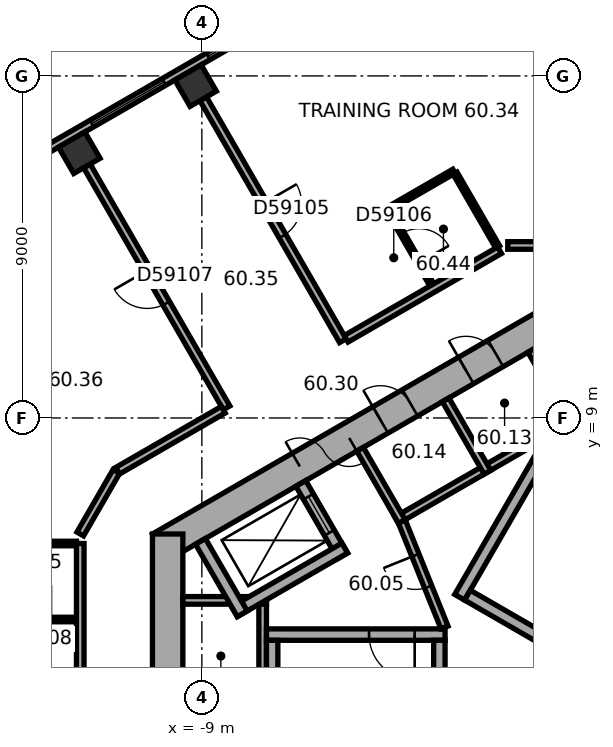
"""IFC4 building model, lengths in metres.
Left out: names, types, materials, properties, quantities, classifications, styles, units other than length and angle.
Written with IfcOpenShell. Run it as: python <this file> out.ifc"""

import sys

from ifc_helpers import new_model, si_unit, direction, frame, frame_2d, origin, origin_2d, place, context, subcontext, project, spatial, rectangle, extrude, element, fill, save


model = new_model("IFC4")
c1 = context("Model", 3, precision=1e-05, world=origin(), true_north=direction((0.0, 1.0)))
c2 = subcontext(c1, "Body", "Model", "MODEL_VIEW")
j1 = project(units=[si_unit("LENGTHUNIT", "METRE"), si_unit("PLANEANGLEUNIT", "RADIAN")], contexts=[c1])
p1 = place(None, origin())
s1 = spatial("IfcSite", under=j1, at=p1, CompositionType="ELEMENT")
p2 = place(p1, origin())
s2 = spatial("IfcBuilding", under=s1, at=p2, CompositionType="ELEMENT")
p3 = place(p2, frame((0.0, 0.0, 243.9)))
s3 = spatial("IfcBuildingStorey", under=s2, at=p3, CompositionType="ELEMENT", Elevation=243.9)
for number, where, z_axis, x_axis in (
    (1, (-9.165, 17.745, 0.0), (0.0, 0.0, 1.0), (-0.866, -0.5, 0.0)),
    (2, (-12.225, 15.978, 0.0), (0.0, 0.0, 1.0), (-0.866, -0.5, 0.0)),
):
    element("IfcColumn", number, at=place(p3, frame(where, z_axis=z_axis, x_axis=x_axis)), inside=s3, PredefinedType="COLUMN", context=c2, shape_type="SweptSolid", body=[
        extrude(rectangle(XDim=0.8, YDim=0.8, at=origin_2d()), origin(), (0.0, 0.0, 1.0), 3.7),
    ])
p4 = place(p3, frame((10.1, 5.6, 0.0), z_axis=(0.0, 0.0, 1.0), x_axis=(-0.866023897231, 0.500002609418, 0.0)))
e3 = element("IfcWall", 3, at=p4, inside=s3, PredefinedType="SHEAR", context=c2, shape_type="SweptSolid", body=[
    extrude(rectangle(XDim=11.894, YDim=0.8, at=frame_2d((5.947, 0.0))), origin(), (0.0, 0.0, 1.0), 3.7),
])
p5 = place(p4, frame((3.897, 0.0, 0.0)))
e4 = element("IfcOpeningElement", 4, at=p5, cuts=e3, PredefinedType="OPENING", context=c2, shape_type="SweptSolid", body=[
    extrude(rectangle(XDim=0.9, YDim=2.1, at=frame_2d((0.45, 1.05))), frame((0.0, 0.41, 0.0), z_axis=(0.0, -1.0, 0.0), x_axis=(1.0, 0.0, 0.0)), (0.0, 0.0, 1.0), 0.82),
])
p6 = place(p4, frame((7.797, 0.0, 0.0)))
e5 = element("IfcOpeningElement", 5, at=p6, cuts=e3, PredefinedType="OPENING", context=c2, shape_type="SweptSolid", body=[
    extrude(rectangle(XDim=0.9, YDim=2.1, at=frame_2d((0.45, 1.05))), frame((0.0, 0.41, 0.0), z_axis=(0.0, -1.0, 0.0), x_axis=(1.0, 0.0, 0.0)), (0.0, 0.0, 1.0), 0.82),
])
p7 = place(p3, frame((0.2, 11.547, 0.0), z_axis=(0.0, 0.0, 1.0), x_axis=(-0.866023897231, -0.500002609418, 0.0)))
e6 = element("IfcWall", 6, at=p7, inside=s3, PredefinedType="SHEAR", context=c2, shape_type="SweptSolid", body=[
    extrude(rectangle(XDim=11.894, YDim=0.8, at=frame_2d((5.947, 0.0))), origin(), (0.0, 0.0, 1.0), 3.7),
])
p8 = place(p7, frame((6.147, 0.0, 0.0)))
e7 = element("IfcOpeningElement", 7, at=p8, cuts=e6, PredefinedType="OPENING", context=c2, shape_type="SweptSolid", body=[
    extrude(rectangle(XDim=1.5, YDim=2.1, at=frame_2d((0.75, 1.05))), frame((0.0, 0.41, 0.0), z_axis=(0.0, -1.0, 0.0), x_axis=(1.0, 0.0, 0.0)), (0.0, 0.0, 1.0), 0.82),
])
p9 = place(p7, frame((1.697, 0.0, 0.0)))
e8 = element("IfcOpeningElement", 8, at=p9, cuts=e6, PredefinedType="OPENING", context=c2, shape_type="SweptSolid", body=[
    extrude(rectangle(XDim=0.9, YDim=2.1, at=frame_2d((0.45, 1.05))), frame((0.0, 0.41, 0.0), z_axis=(0.0, -1.0, 0.0), x_axis=(1.0, 0.0, 0.0)), (0.0, 0.0, 1.0), 0.82),
])
p10 = place(p7, frame((4.297, 0.0, 0.0)))
e9 = element("IfcOpeningElement", 9, at=p10, cuts=e6, PredefinedType="OPENING", context=c2, shape_type="SweptSolid", body=[
    extrude(rectangle(XDim=0.9, YDim=2.1, at=frame_2d((0.45, 1.05))), frame((0.0, 0.41, 0.0), z_axis=(0.0, -1.0, 0.0), x_axis=(1.0, 0.0, 0.0)), (0.0, 0.0, 1.0), 0.82),
])
p11 = place(p3, frame((-9.9, 5.947, 0.0), z_axis=(0.0, 0.0, 1.0), x_axis=(0.0, -1.0, 0.0)))
e10 = element("IfcWall", 10, at=p11, inside=s3, PredefinedType="SHEAR", context=c2, shape_type="SweptSolid", body=[
    extrude(rectangle(XDim=11.894, YDim=0.8, at=frame_2d((5.947, 0.0))), origin(), (0.0, 0.0, 1.0), 3.7),
])
p12 = place(p11, frame((5.097, 0.0, 0.0)))
e11 = element("IfcOpeningElement", 11, at=p12, cuts=e10, PredefinedType="OPENING", context=c2, shape_type="SweptSolid", body=[
    extrude(rectangle(XDim=1.1, YDim=2.1, at=frame_2d((0.55, 1.05))), frame((0.0, 0.41, 0.0), z_axis=(0.0, -1.0, 0.0), x_axis=(1.0, 0.0, 0.0)), (0.0, 0.0, 1.0), 0.82),
])
p13 = place(p11, frame((7.697, 0.0, 0.0)))
e12 = element("IfcOpeningElement", 12, at=p13, cuts=e10, PredefinedType="OPENING", context=c2, shape_type="SweptSolid", body=[
    extrude(rectangle(XDim=1.1, YDim=2.1, at=frame_2d((0.55, 1.05))), frame((0.0, 0.41, 0.0), z_axis=(0.0, -1.0, 0.0), x_axis=(1.0, 0.0, 0.0)), (0.0, 0.0, 1.0), 0.82),
])
p14 = place(p3, frame((-2.786, 22.005, 0.0), z_axis=(0.0, 0.0, 1.0), x_axis=(-0.866026555358, -0.49999800541, 0.0)))
e13 = element("IfcWall", 13, at=p14, inside=s3, PredefinedType="STANDARD", context=c2, shape_type="SweptSolid", body=[
    extrude(rectangle(XDim=18.841, YDim=0.2, at=frame_2d((9.421, 0.0))), origin(), (0.0, 0.0, 1.0), 3.7),
])
p15 = place(p14, frame((1.254, 0.0, 0.9)))
e14 = element("IfcOpeningElement", 14, at=p15, cuts=e13, PredefinedType="OPENING", context=c2, shape_type="SweptSolid", body=[
    extrude(rectangle(XDim=2.2, YDim=2.0, at=frame_2d((1.1, 1.0))), frame((0.0, 0.11, 0.0), z_axis=(0.0, -1.0, 0.0), x_axis=(1.0, 0.0, 0.0)), (0.0, 0.0, 1.0), 0.22),
])
p16 = place(p14, frame((4.788, 0.0, 0.9)))
e15 = element("IfcOpeningElement", 15, at=p16, cuts=e13, PredefinedType="OPENING", context=c2, shape_type="SweptSolid", body=[
    extrude(rectangle(XDim=2.2, YDim=2.0, at=frame_2d((1.1, 1.0))), frame((0.0, 0.11, 0.0), z_axis=(0.0, -1.0, 0.0), x_axis=(1.0, 0.0, 0.0)), (0.0, 0.0, 1.0), 0.22),
])
p17 = place(p14, frame((8.321, 0.0, 0.9)))
e16 = element("IfcOpeningElement", 16, at=p17, cuts=e13, PredefinedType="OPENING", context=c2, shape_type="SweptSolid", body=[
    extrude(rectangle(XDim=2.2, YDim=2.0, at=frame_2d((1.1, 1.0))), frame((0.0, 0.11, 0.0), z_axis=(0.0, -1.0, 0.0), x_axis=(1.0, 0.0, 0.0)), (0.0, 0.0, 1.0), 0.22),
])
p18 = place(p14, frame((11.855, 0.0, 0.9)))
e17 = element("IfcOpeningElement", 17, at=p18, cuts=e13, PredefinedType="OPENING", context=c2, shape_type="SweptSolid", body=[
    extrude(rectangle(XDim=2.2, YDim=2.0, at=frame_2d((1.1, 1.0))), frame((0.0, 0.11, 0.0), z_axis=(0.0, -1.0, 0.0), x_axis=(1.0, 0.0, 0.0)), (0.0, 0.0, 1.0), 0.22),
])
p19 = place(p14, frame((15.389, 0.0, 0.9)))
e18 = element("IfcOpeningElement", 18, at=p19, cuts=e13, PredefinedType="OPENING", context=c2, shape_type="SweptSolid", body=[
    extrude(rectangle(XDim=2.2, YDim=2.0, at=frame_2d((1.1, 1.0))), frame((0.0, 0.11, 0.0), z_axis=(0.0, -1.0, 0.0), x_axis=(1.0, 0.0, 0.0)), (0.0, 0.0, 1.0), 0.22),
])
p20 = place(p3, frame((0.803, 9.009, 0.0), z_axis=(0.0, 0.0, 1.0), x_axis=(-0.866028230842, -0.499995103361, 0.0)))
e19 = element("IfcWall", 19, at=p20, inside=s3, PredefinedType="PARTITIONING", context=c2, shape_type="SweptSolid", body=[
    extrude(rectangle(XDim=5.4, YDim=0.2, at=frame_2d((2.7, 0.0))), origin(), (0.0, 0.0, 1.0), 3.42),
])
p21 = place(p3, frame((0.767, 8.872, 0.0), z_axis=(0.0, 0.0, 1.0), x_axis=(-0.499994660107, 0.866028486751, 0.0)))
e20 = element("IfcWall", 20, at=p21, inside=s3, PredefinedType="PARTITIONING", context=c2, shape_type="SweptSolid", body=[
    extrude(rectangle(XDim=2.2, YDim=0.2, at=frame_2d((1.1, 0.0))), origin(), (0.0, 0.0, 1.0), 3.42),
])
for number, where, z_axis, x_axis in (
    (21, (-1.485, 7.572, 0.0), (0.0, 0.0, 1.0), (-0.5, 0.866, 0.0)),
    (22, (-3.737, 6.272, 0.0), (0.0, 0.0, 1.0), (-0.5, 0.866, 0.0)),
):
    element("IfcWall", number, at=place(p3, frame(where, z_axis=z_axis, x_axis=x_axis)), inside=s3, PredefinedType="PARTITIONING", context=c2, shape_type="SweptSolid", body=[
        extrude(rectangle(XDim=2.2, YDim=0.2, at=frame_2d((1.1, 0.0))), origin(), (0.0, 0.0, 1.0), 3.42),
    ])
p22 = place(p3, frame((-7.4, 4.3, 0.0), z_axis=(0.0, 0.0, 1.0), x_axis=(0.0, -1.0, 0.0)))
e23 = element("IfcWall", 23, at=p22, inside=s3, PredefinedType="PARTITIONING", context=c2, shape_type="SweptSolid", body=[
    extrude(rectangle(XDim=8.0, YDim=0.2, at=frame_2d((4.0, 0.0))), origin(), (0.0, 0.0, 1.0), 3.42),
])
p23 = place(p3, frame((-7.3, 4.2, 0.0), z_axis=(0.0, 0.0, 1.0), x_axis=(-1.0, 0.0, 0.0)))
e24 = element("IfcWall", 24, at=p23, inside=s3, PredefinedType="PARTITIONING", context=c2, shape_type="SweptSolid", body=[
    extrude(rectangle(XDim=2.2, YDim=0.2, at=frame_2d((1.1, 0.0))), origin(), (0.0, 0.0, 1.0), 3.42),
])
p24 = place(p3, frame((-2.216, 4.282, 0.0), z_axis=(0.0, 0.0, 1.0), x_axis=(0.499977259774, 0.866038532462, 0.0)))
e25 = element("IfcWall", 25, at=p24, inside=s3, PredefinedType="SHEAR", context=c2, shape_type="SweptSolid", body=[
    extrude(rectangle(XDim=4.7, YDim=0.3, at=frame_2d((2.35, 0.0))), origin(), (0.0, 0.0, 1.0), 3.42),
])
p25 = place(p3, frame((4.103, 0.807, 0.0), z_axis=(0.0, 0.0, 1.0), x_axis=(-0.866027801685, 0.499995846692, 0.0)))
e26 = element("IfcWall", 26, at=p25, inside=s3, PredefinedType="SHEAR", context=c2, shape_type="SweptSolid", body=[
    extrude(rectangle(XDim=7.06, YDim=0.3, at=frame_2d((3.53, 0.0))), origin(), (0.0, 0.0, 1.0), 3.42),
])
p26 = place(p3, frame((-2.6, 3.3, 0.0), z_axis=(0.0, 0.0, 1.0), x_axis=(-1.0, 0.0, 0.0)))
e27 = element("IfcWall", 27, at=p26, inside=s3, PredefinedType="SHEAR", context=c2, shape_type="SweptSolid", body=[
    extrude(rectangle(XDim=4.7, YDim=0.3, at=frame_2d((2.35, 0.0))), origin(), (0.0, 0.0, 1.0), 3.42),
])
p27 = place(p26, frame((0.8, 0.0, 0.0)))
e28 = element("IfcOpeningElement", 28, at=p27, cuts=e27, PredefinedType="OPENING", context=c2, shape_type="SweptSolid", body=[
    extrude(rectangle(XDim=1.2, YDim=2.1, at=frame_2d((0.6, 1.05))), frame((0.0, 0.16, 0.0), z_axis=(0.0, -1.0, 0.0), x_axis=(1.0, 0.0, 0.0)), (0.0, 0.0, 1.0), 0.32),
])
for number, where, z_axis, x_axis in (
    (29, (-2.75, 3.15, 0.0), (0.0, 0.0, 1.0), (0.0, -1.0, 0.0)),
    (30, (-7.15, 3.15, 0.0), (0.0, 0.0, 1.0), (0.0, -1.0, 0.0)),
):
    element("IfcWall", number, at=place(p3, frame(where, z_axis=z_axis, x_axis=x_axis)), inside=s3, PredefinedType="SHEAR", context=c2, shape_type="SweptSolid", body=[
        extrude(rectangle(XDim=7.06, YDim=0.3, at=frame_2d((3.53, 0.0))), origin(), (0.0, 0.0, 1.0), 3.42),
    ])
p28 = place(p3, frame((-5.295, 5.372, 0.0), z_axis=(0.0, 0.0, 1.0), x_axis=(-0.500077893725, 0.86598042715, 0.0)))
e31 = element("IfcWall", 31, at=p28, inside=s3, PredefinedType="SHEAR", context=c2, shape_type="SweptSolid", body=[
    extrude(rectangle(XDim=2.2, YDim=0.3, at=frame_2d((1.1, 0.0))), origin(), (0.0, 0.0, 1.0), 3.42),
])
p29 = place(p28, frame((0.7, 0.0, 0.0)))
e32 = element("IfcOpeningElement", 32, at=p29, cuts=e31, PredefinedType="OPENING", context=c2, shape_type="SweptSolid", body=[
    extrude(rectangle(XDim=1.1, YDim=2.1, at=frame_2d((0.55, 1.05))), frame((0.0, 0.16, 0.0), z_axis=(0.0, -1.0, 0.0), x_axis=(1.0, 0.0, 0.0)), (0.0, 0.0, 1.0), 0.32),
])
p30 = place(p3, frame((-5.24, 5.577, 0.0), z_axis=(0.0, 0.0, 1.0), x_axis=(-0.866014461049, -0.500018952895, 0.0)))
e33 = element("IfcWall", 33, at=p30, inside=s3, PredefinedType="SHEAR", context=c2, shape_type="SweptSolid", body=[
    extrude(rectangle(XDim=3.35, YDim=0.3, at=frame_2d((1.675, 0.0))), origin(), (0.0, 0.0, 1.0), 3.42),
])
p31 = place(p3, frame((-7.937, 3.847, 0.0), z_axis=(0.0, 0.0, 1.0), x_axis=(-0.50002983664, 0.866008176907, 0.0)))
e34 = element("IfcWall", 34, at=p31, inside=s3, PredefinedType="SHEAR", context=c2, shape_type="SweptSolid", body=[
    extrude(rectangle(XDim=2.2, YDim=0.3, at=frame_2d((1.1, 0.0))), origin(), (0.0, 0.0, 1.0), 3.42),
])
p32 = place(p3, frame((-2.615, 3.487, 0.0), z_axis=(0.0, 0.0, 1.0), x_axis=(-0.373576831041, 0.92759924068, 0.0)))
e35 = element("IfcWall", 35, at=p32, inside=s3, PredefinedType="PARTITIONING", context=c2, shape_type="SweptSolid", body=[
    extrude(rectangle(XDim=3.002, YDim=0.2, at=frame_2d((1.501, 0.0))), origin(), (0.0, 0.0, 1.0), 3.42),
])
p33 = place(p32, frame((1.15, 0.0, 0.0)))
e36 = element("IfcOpeningElement", 36, at=p33, cuts=e35, PredefinedType="OPENING", context=c2, shape_type="SweptSolid", body=[
    extrude(rectangle(XDim=0.9, YDim=2.1, at=frame_2d((0.45, 1.05))), frame((0.0, 0.11, 0.0), z_axis=(0.0, -1.0, 0.0), x_axis=(1.0, 0.0, 0.0)), (0.0, 0.0, 1.0), 0.22),
])
p34 = place(p3, frame((-14.54, 5.697, 0.0), z_axis=(0.0, 0.0, 1.0), x_axis=(1.0, 0.0, 0.0)))
e37 = element("IfcWall", 37, at=p34, inside=s3, PredefinedType="PARTITIONING", context=c2, shape_type="SweptSolid", body=[
    extrude(rectangle(XDim=2.24, YDim=0.12, at=frame_2d((1.12, 0.0))), origin(), (0.0, 0.0, 1.0), 3.42),
])
p35 = place(p3, frame((-12.3, 3.697, 0.0), z_axis=(0.0, 0.0, 1.0), x_axis=(-1.0, 0.0, 0.0)))
e38 = element("IfcWall", 38, at=p35, inside=s3, PredefinedType="PARTITIONING", context=c2, shape_type="SweptSolid", body=[
    extrude(rectangle(XDim=2.24, YDim=0.12, at=frame_2d((1.12, 0.0))), origin(), (0.0, 0.0, 1.0), 3.42),
])
p36 = place(p35, frame((0.67, 0.0, 0.0)))
e39 = element("IfcOpeningElement", 39, at=p36, cuts=e38, PredefinedType="OPENING", context=c2, shape_type="SweptSolid", body=[
    extrude(rectangle(XDim=0.9, YDim=2.1, at=frame_2d((0.45, 1.05))), frame((0.0, 0.07, 0.0), z_axis=(0.0, -1.0, 0.0), x_axis=(1.0, 0.0, 0.0)), (0.0, 0.0, 1.0), 0.14),
])
p37 = place(p3, frame((-12.2, 5.697, 0.0), z_axis=(0.0, 0.0, 1.0), x_axis=(0.0, -1.0, 0.0)))
e40 = element("IfcWall", 40, at=p37, inside=s3, PredefinedType="PARTITIONING", context=c2, shape_type="SweptSolid", body=[
    extrude(rectangle(XDim=3.496, YDim=0.2, at=frame_2d((1.748, 0.0))), origin(), (0.0, 0.0, 1.0), 3.42),
])
p38 = place(p3, frame((-12.025, 15.632, 0.0), z_axis=(0.0, 0.0, 1.0), x_axis=(0.499983153418, -0.866035129944, 0.0)))
e41 = element("IfcWall", 41, at=p38, inside=s3, PredefinedType="PARTITIONING", context=c2, shape_type="SweptSolid", body=[
    extrude(rectangle(XDim=7.35, YDim=0.2, at=frame_2d((3.675, 0.0))), origin(), (0.0, 0.0, 1.0), 3.42),
])
p39 = place(p38, frame((3.175, 0.0, 0.0)))
e42 = element("IfcOpeningElement", 42, at=p39, cuts=e41, PredefinedType="OPENING", context=c2, shape_type="SweptSolid", body=[
    extrude(rectangle(XDim=1.0, YDim=2.1, at=frame_2d((0.5, 1.05))), frame((0.0, 0.11, 0.0), z_axis=(0.0, -1.0, 0.0), x_axis=(1.0, 0.0, 0.0)), (0.0, 0.0, 1.0), 0.22),
])
p40 = place(p3, frame((-11.25, 7.592, 0.0), z_axis=(0.0, 0.0, 1.0), x_axis=(-0.500022797313, -0.86601224135, 0.0)))
e43 = element("IfcWall", 43, at=p40, inside=s3, PredefinedType="PARTITIONING", context=c2, shape_type="SweptSolid", body=[
    extrude(rectangle(XDim=1.9, YDim=0.2, at=frame_2d((0.95, 0.0))), origin(), (0.0, 0.0, 1.0), 3.42),
])
p41 = place(p3, frame((-8.965, 17.399, 0.0), z_axis=(0.0, 0.0, 1.0), x_axis=(0.499993683172, -0.866029050776, 0.0)))
e44 = element("IfcWall", 44, at=p41, inside=s3, PredefinedType="PARTITIONING", context=c2, shape_type="SweptSolid", body=[
    extrude(rectangle(XDim=7.35, YDim=0.2, at=frame_2d((3.675, 0.0))), origin(), (0.0, 0.0, 1.0), 2.87),
])
p42 = place(p41, frame((3.175, 0.0, 0.0)))
e45 = element("IfcOpeningElement", 45, at=p42, cuts=e44, PredefinedType="OPENING", context=c2, shape_type="SweptSolid", body=[
    extrude(rectangle(XDim=1.0, YDim=2.1, at=frame_2d((0.5, 1.05))), frame((0.0, 0.11, 0.0), z_axis=(0.0, -1.0, 0.0), x_axis=(1.0, 0.0, 0.0)), (0.0, 0.0, 1.0), 0.22),
])
p43 = place(p3, frame((-8.437, 9.217, 0.0), z_axis=(0.0, 0.0, 1.0), x_axis=(-0.866005660673, -0.500034194513, 0.0)))
e46 = element("IfcWall", 46, at=p43, inside=s3, PredefinedType="PARTITIONING", context=c2, shape_type="SweptSolid", body=[
    extrude(rectangle(XDim=3.209, YDim=0.2, at=frame_2d((1.604, 0.0))), origin(), (0.0, 0.0, 1.0), 3.42),
])
p44 = place(p3, frame((-4.099, 14.492, 0.0), z_axis=(0.0, 0.0, 1.0), x_axis=(0.866041268327, 0.499972520799, 0.0)))
e47 = element("IfcWall", 47, at=p44, inside=s3, PredefinedType="PARTITIONING", context=c2, shape_type="SweptSolid", body=[
    extrude(rectangle(XDim=2.0, YDim=0.12, at=frame_2d((1.0, 0.0))), origin(), (0.0, 0.0, 1.0), 3.42),
])
p45 = place(p3, frame((-2.948, 12.5, 0.0), z_axis=(0.0, 0.0, 1.0), x_axis=(-0.500077830873, 0.865980463445, 0.0)))
e48 = element("IfcWall", 48, at=p45, inside=s3, PredefinedType="PARTITIONING", context=c2, shape_type="SweptSolid", body=[
    extrude(rectangle(XDim=2.24, YDim=0.12, at=frame_2d((1.12, 0.0))), origin(), (0.0, 0.0, 1.0), 3.42),
])
p46 = place(p45, frame((0.67, 0.0, 0.0)))
e49 = element("IfcOpeningElement", 49, at=p46, cuts=e48, PredefinedType="OPENING", context=c2, shape_type="SweptSolid", body=[
    extrude(rectangle(XDim=0.9, YDim=2.1, at=frame_2d((0.45, 1.05))), frame((0.0, 0.07, 0.0), z_axis=(0.0, -1.0, 0.0), x_axis=(1.0, 0.0, 0.0)), (0.0, 0.0, 1.0), 0.14),
])
p47 = place(p3, frame((-2.336, 15.44, 0.0), z_axis=(0.0, 0.0, 1.0), x_axis=(0.49999608499, -0.866027664105, 0.0)))
e50 = element("IfcWall", 50, at=p47, inside=s3, PredefinedType="PARTITIONING", context=c2, shape_type="SweptSolid", body=[
    extrude(rectangle(XDim=2.24, YDim=0.12, at=frame_2d((1.12, 0.0))), origin(), (0.0, 0.0, 1.0), 3.42),
])
p48 = place(p3, frame((-1.167, 13.414, 0.0), z_axis=(0.0, 0.0, 1.0), x_axis=(-0.866023347809, -0.500003561037, 0.0)))
e51 = element("IfcWall", 51, at=p48, inside=s3, PredefinedType="PARTITIONING", context=c2, shape_type="SweptSolid", body=[
    extrude(rectangle(XDim=4.661, YDim=0.2, at=frame_2d((2.331, 0.0))), origin(), (0.0, 0.0, 1.0), 3.42),
])
p49 = place(p3, frame((0.95, 13.539, 0.0), z_axis=(0.0, 0.0, 1.0), x_axis=(-1.0, 0.0, 0.0)))
e52 = element("IfcWall", 52, at=p49, inside=s3, PredefinedType="PARTITIONING", context=c2, shape_type="SweptSolid", body=[
    extrude(rectangle(XDim=1.9, YDim=0.2, at=frame_2d((0.95, 0.0))), origin(), (0.0, 0.0, 1.0), 3.42),
])
p50 = place(p16, origin())
e53 = element("IfcWindow", 53, at=p50, inside=s3, PartitioningType="SINGLE_PANEL", PredefinedType="WINDOW", context=c2, shape_type="SweptSolid", body=[
    extrude(rectangle(XDim=2.2, YDim=2.0, at=frame_2d((1.1, 1.0))), frame((0.0, 0.03, 0.0), z_axis=(0.0, -1.0, 0.0), x_axis=(1.0, 0.0, 0.0)), (0.0, 0.0, 1.0), 0.06),
])
fill(e15, e53)
p51 = place(p17, origin())
e54 = element("IfcWindow", 54, at=p51, inside=s3, PartitioningType="SINGLE_PANEL", PredefinedType="WINDOW", context=c2, shape_type="SweptSolid", body=[
    extrude(rectangle(XDim=2.2, YDim=2.0, at=frame_2d((1.1, 1.0))), frame((0.0, 0.03, 0.0), z_axis=(0.0, -1.0, 0.0), x_axis=(1.0, 0.0, 0.0)), (0.0, 0.0, 1.0), 0.06),
])
fill(e16, e54)
p52 = place(p8, origin())
e55 = element("IfcDoor", 55, at=p52, inside=s3, OperationType="DOUBLE_DOOR_SINGLE_SWING", PredefinedType="DOOR", context=c2, shape_type="SweptSolid", body=[
    extrude(rectangle(XDim=1.5, YDim=2.1, at=frame_2d((0.75, 1.05))), frame((0.0, 0.025, 0.0), z_axis=(0.0, -1.0, 0.0), x_axis=(1.0, 0.0, 0.0)), (0.0, 0.0, 1.0), 0.05),
])
fill(e7, e55)
p53 = place(p27, origin())
e56 = element("IfcDoor", 56, at=p53, inside=s3, OperationType="SINGLE_SWING_RIGHT", PredefinedType="DOOR", context=c2, shape_type="SweptSolid", body=[
    extrude(rectangle(XDim=1.2, YDim=2.1, at=frame_2d((0.6, 1.05))), frame((0.0, 0.025, 0.0), z_axis=(0.0, -1.0, 0.0), x_axis=(1.0, 0.0, 0.0)), (0.0, 0.0, 1.0), 0.05),
])
fill(e28, e56)
p54 = place(p33, origin())
e57 = element("IfcDoor", 57, at=p54, inside=s3, OperationType="SINGLE_SWING_LEFT", PredefinedType="DOOR", context=c2, shape_type="SweptSolid", body=[
    extrude(rectangle(XDim=0.9, YDim=2.1, at=frame_2d((0.45, 1.05))), frame((0.0, 0.025, 0.0), z_axis=(0.0, -1.0, 0.0), x_axis=(1.0, 0.0, 0.0)), (0.0, 0.0, 1.0), 0.05),
])
fill(e36, e57)
p55 = place(p9, origin())
e58 = element("IfcDoor", 58, at=p55, inside=s3, OperationType="SINGLE_SWING_LEFT", PredefinedType="DOOR", context=c2, shape_type="SweptSolid", body=[
    extrude(rectangle(XDim=0.9, YDim=2.1, at=frame_2d((0.45, 1.05))), frame((0.0, 0.025, 0.0), z_axis=(0.0, -1.0, 0.0), x_axis=(1.0, 0.0, 0.0)), (0.0, 0.0, 1.0), 0.05),
])
fill(e8, e58)
p56 = place(p10, origin())
e59 = element("IfcDoor", 59, at=p56, inside=s3, OperationType="SINGLE_SWING_LEFT", PredefinedType="DOOR", context=c2, shape_type="SweptSolid", body=[
    extrude(rectangle(XDim=0.9, YDim=2.1, at=frame_2d((0.45, 1.05))), frame((0.0, 0.025, 0.0), z_axis=(0.0, -1.0, 0.0), x_axis=(1.0, 0.0, 0.0)), (0.0, 0.0, 1.0), 0.05),
])
fill(e9, e59)
p57 = place(p29, origin())
e60 = element("IfcDoor", 60, at=p57, inside=s3, OperationType="DOUBLE_DOOR_SLIDING", PredefinedType="DOOR", context=c2, shape_type="SweptSolid", body=[
    extrude(rectangle(XDim=1.1, YDim=2.1, at=frame_2d((0.55, 1.05))), frame((0.0, 0.025, 0.0), z_axis=(0.0, -1.0, 0.0), x_axis=(1.0, 0.0, 0.0)), (0.0, 0.0, 1.0), 0.05),
])
fill(e32, e60)
p58 = place(p42, origin())
e61 = element("IfcDoor", 61, at=p58, inside=s3, OperationType="SINGLE_SWING_LEFT", PredefinedType="DOOR", context=c2, shape_type="SweptSolid", body=[
    extrude(rectangle(XDim=1.0, YDim=2.1, at=frame_2d((0.5, 1.05))), frame((0.0, 0.025, 0.0), z_axis=(0.0, -1.0, 0.0), x_axis=(1.0, 0.0, 0.0)), (0.0, 0.0, 1.0), 0.05),
])
fill(e45, e61)
p59 = place(p46, origin())
e62 = element("IfcDoor", 62, at=p59, inside=s3, OperationType="SINGLE_SWING_LEFT", PredefinedType="DOOR", context=c2, shape_type="SweptSolid", body=[
    extrude(rectangle(XDim=0.9, YDim=2.1, at=frame_2d((0.45, 1.05))), frame((0.0, 0.025, 0.0), z_axis=(0.0, -1.0, 0.0), x_axis=(1.0, 0.0, 0.0)), (0.0, 0.0, 1.0), 0.05),
])
fill(e49, e62)
p60 = place(p39, origin())
e63 = element("IfcDoor", 63, at=p60, inside=s3, OperationType="SINGLE_SWING_LEFT", PredefinedType="DOOR", context=c2, shape_type="SweptSolid", body=[
    extrude(rectangle(XDim=1.0, YDim=2.1, at=frame_2d((0.5, 1.05))), frame((0.0, 0.025, 0.0), z_axis=(0.0, -1.0, 0.0), x_axis=(1.0, 0.0, 0.0)), (0.0, 0.0, 1.0), 0.05),
])
fill(e42, e63)
save(model, sys.argv[1])
